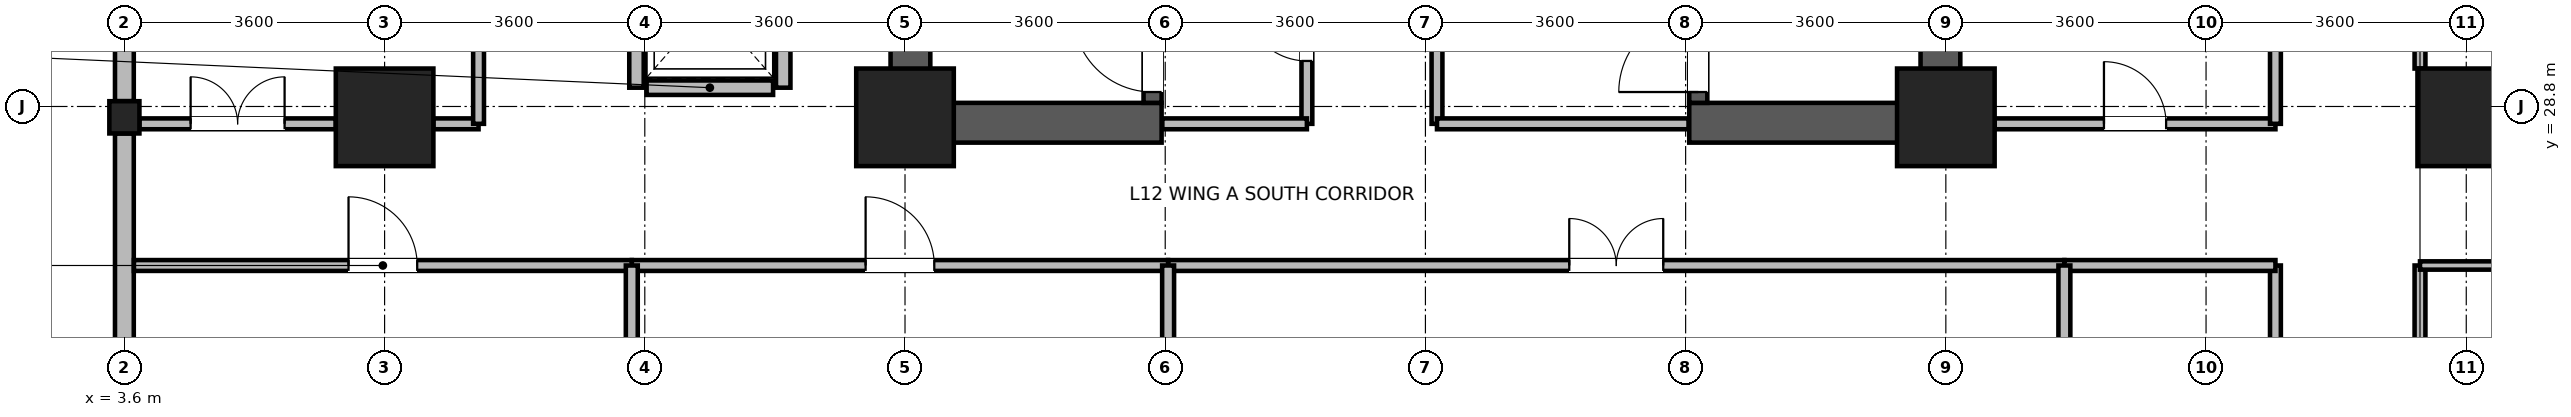
"""IFC4 building model, lengths in metres.
Left out: names, types, materials, properties, quantities, classifications, styles, units other than length and angle.
Written with IfcOpenShell. Run it as: python <this file> out.ifc"""

import sys

from ifc_helpers import new_model, si_unit, direction, frame, frame_2d, origin, origin_2d, place, context, subcontext, project, spatial, rectangle, i_section, extrude, source, transform, mapped, element, fill, save


model = new_model("IFC4")
c1 = context("Model", 3, precision=1e-05, world=origin(), true_north=direction((0.0, 1.0)))
c2 = subcontext(c1, "Body", "Model", "MODEL_VIEW")
j1 = project(units=[si_unit("LENGTHUNIT", "METRE"), si_unit("PLANEANGLEUNIT", "RADIAN")], contexts=[c1])
p1 = place(None, origin())
s1 = spatial("IfcSite", under=j1, at=p1, CompositionType="ELEMENT")
p2 = place(p1, origin())
s2 = spatial("IfcBuilding", under=s1, at=p2, CompositionType="ELEMENT")
p3 = place(p2, frame((0.0, 0.0, 51.2)))
s3 = spatial("IfcBuildingStorey", under=s2, at=p3, CompositionType="ELEMENT", Elevation=51.2)
for number, where, z_axis, x_axis in (
    (1, (14.475, 28.3, 0.0), (0.0, 0.0, 1.0), (0.0, 1.0, 0.0)),
    (2, (28.725, 28.3, 0.0), (0.0, 0.0, 1.0), (0.0, 1.0, 0.0)),
):
    element("IfcWall", number, at=place(p3, frame(where, z_axis=z_axis, x_axis=x_axis)), inside=s3, PredefinedType="SHEAR", context=c2, shape_type="SweptSolid", body=[
        extrude(rectangle(XDim=8.1, YDim=0.55, at=frame_2d((4.05, 0.0))), origin(), (0.0, 0.0, 1.0), 3.45),
    ])
for number, where, z_axis, x_axis in (
    (3, (14.75, 28.575, 0.0), (0.0, 0.0, 1.0), (1.0, 0.0, 0.0)),
    (4, (25.25, 28.575, 0.0), (0.0, 0.0, 1.0), (1.0, 0.0, 0.0)),
):
    element("IfcWall", number, at=place(p3, frame(where, z_axis=z_axis, x_axis=x_axis)), inside=s3, PredefinedType="SHEAR", context=c2, shape_type="SweptSolid", body=[
        extrude(rectangle(XDim=3.2, YDim=0.55, at=frame_2d((1.6, 0.0))), origin(), (0.0, 0.0, 1.0), 3.45),
    ])
p4 = place(p3, frame((17.825, 28.85, 0.0), z_axis=(0.0, 0.0, 1.0), x_axis=(0.0, 1.0, 0.0)))
e5 = element("IfcWall", 5, at=p4, inside=s3, PredefinedType="SHEAR", context=c2, shape_type="SweptSolid", body=[
    extrude(rectangle(XDim=7.0, YDim=0.25, at=frame_2d((3.5, 0.0))), origin(), (0.0, 0.0, 1.0), 3.45),
])
p5 = place(p4, frame((0.15, 0.0, 0.0)))
e6 = element("IfcOpeningElement", 6, at=p5, cuts=e5, PredefinedType="OPENING", context=c2, shape_type="SweptSolid", body=[
    extrude(rectangle(XDim=1.1, YDim=2.08, at=frame_2d((0.55, 1.04))), frame((0.0, 0.135, 0.0), z_axis=(0.0, -1.0, 0.0), x_axis=(1.0, 0.0, 0.0)), (0.0, 0.0, 1.0), 0.27),
])
p6 = place(p3, frame((25.375, 28.85, 0.0), z_axis=(0.0, 0.0, 1.0), x_axis=(0.0, 1.0, 0.0)))
e7 = element("IfcWall", 7, at=p6, inside=s3, PredefinedType="SHEAR", context=c2, shape_type="SweptSolid", body=[
    extrude(rectangle(XDim=7.0, YDim=0.25, at=frame_2d((3.5, 0.0))), origin(), (0.0, 0.0, 1.0), 3.45),
])
p7 = place(p6, frame((0.15, 0.0, 0.0)))
e8 = element("IfcOpeningElement", 8, at=p7, cuts=e7, PredefinedType="OPENING", context=c2, shape_type="SweptSolid", body=[
    extrude(rectangle(XDim=1.1, YDim=2.08, at=frame_2d((0.55, 1.04))), frame((0.0, 0.135, 0.0), z_axis=(0.0, -1.0, 0.0), x_axis=(1.0, 0.0, 0.0)), (0.0, 0.0, 1.0), 0.27),
])
m1 = source(origin(), c2, "Body", "SweptSolid", [
    extrude(rectangle(XDim=1.35, YDim=1.35, at=origin_2d()), origin(), (0.0, 0.0, 1.0), 3.7),
])
for number, where, z_axis, x_axis in (
    (9, (7.2, 28.65, 0.0), (0.0, 0.0, 1.0), (1.0, 0.0, 0.0)),
    (10, (14.4, 28.65, 0.0), (0.0, 0.0, 1.0), (1.0, 0.0, 0.0)),
    (11, (28.8, 28.65, 0.0), (0.0, 0.0, 1.0), (1.0, 0.0, 0.0)),
    (12, (36.0, 28.65, 0.0), (0.0, 0.0, 1.0), (1.0, 0.0, 0.0)),
):
    element("IfcColumn", number, at=place(p3, frame(where, z_axis=z_axis, x_axis=x_axis)), inside=s3, PredefinedType="COLUMN", context=c2, shape_type="MappedRepresentation", body=[
        mapped(m1, transform((0.0, 0.0, 0.0), x_axis=(1.0, 0.0, 0.0), y_axis=(0.0, 1.0, 0.0), z_axis=(0.0, 0.0, 1.0), scale=1.0)),
    ])
m2 = source(origin(), c2, "Body", "SweptSolid", [
    extrude(i_section(OverallWidth=0.416, OverallDepth=0.446, WebThickness=0.029, FlangeThickness=0.04, FilletRadius=0.015, at=origin_2d()), origin(), (0.0, 0.0, 1.0), 3.7),
])
p8 = place(p3, frame((3.6, 28.65, 0.0), z_axis=(0.0, 0.0, 1.0), x_axis=(1.0, 0.0, 0.0)))
e13 = element("IfcColumn", 13, at=p8, inside=s3, PredefinedType="COLUMN", context=c2, shape_type="MappedRepresentation", body=[
    mapped(m2, transform((0.0, 0.0, 0.0), x_axis=(1.0, 0.0, 0.0), y_axis=(0.0, 1.0, 0.0), z_axis=(0.0, 0.0, 1.0), scale=1.0)),
])
p9 = place(p3, frame((3.6, 28.874, 0.0), z_axis=(0.0, 0.0, 1.0), x_axis=(0.0, 1.0, 0.0)))
e14 = element("IfcWall", 14, at=p9, inside=s3, PredefinedType="STANDARD", context=c2, shape_type="SweptSolid", body=[
    extrude(rectangle(XDim=7.052, YDim=0.26, at=frame_2d((3.526, 0.0))), origin(), (0.0, 0.0, 1.0), 2.93),
])
p10 = place(p9, frame((1.013, 0.0, 0.85)))
e15 = element("IfcOpeningElement", 15, at=p10, cuts=e14, PredefinedType="OPENING", context=c2, shape_type="SweptSolid", body=[
    extrude(rectangle(XDim=1.5, YDim=1.85, at=frame_2d((0.75, 0.925))), frame((0.0, 0.14, 0.0), z_axis=(0.0, -1.0, 0.0), x_axis=(1.0, 0.0, 0.0)), (0.0, 0.0, 1.0), 0.28),
])
p11 = place(p9, frame((4.539, 0.0, 0.85)))
e16 = element("IfcOpeningElement", 16, at=p11, cuts=e14, PredefinedType="OPENING", context=c2, shape_type="SweptSolid", body=[
    extrude(rectangle(XDim=1.5, YDim=1.85, at=frame_2d((0.75, 0.925))), frame((0.0, 0.14, 0.0), z_axis=(0.0, -1.0, 0.0), x_axis=(1.0, 0.0, 0.0)), (0.0, 0.0, 1.0), 0.28),
])
p12 = place(p3, frame((3.6, 21.47, 0.0), z_axis=(0.0, 0.0, 1.0), x_axis=(0.0, 1.0, 0.0)))
e17 = element("IfcWall", 17, at=p12, inside=s3, PredefinedType="STANDARD", context=c2, shape_type="SweptSolid", body=[
    extrude(rectangle(XDim=6.956, YDim=0.26, at=frame_2d((3.478, 0.0))), origin(), (0.0, 0.0, 1.0), 3.43),
])
p13 = place(p12, frame((0.989, 0.0, 0.85)))
e18 = element("IfcOpeningElement", 18, at=p13, cuts=e17, PredefinedType="OPENING", context=c2, shape_type="SweptSolid", body=[
    extrude(rectangle(XDim=1.5, YDim=1.85, at=frame_2d((0.75, 0.925))), frame((0.0, 0.14, 0.0), z_axis=(0.0, -1.0, 0.0), x_axis=(1.0, 0.0, 0.0)), (0.0, 0.0, 1.0), 0.28),
])
p14 = place(p12, frame((3.003, 0.0, 0.85)))
e19 = element("IfcOpeningElement", 19, at=p14, cuts=e17, PredefinedType="OPENING", context=c2, shape_type="SweptSolid", body=[
    extrude(rectangle(XDim=0.95, YDim=1.75, at=frame_2d((0.475, 0.875))), frame((0.0, 0.14, 0.0), z_axis=(0.0, -1.0, 0.0), x_axis=(1.0, 0.0, 0.0)), (0.0, 0.0, 1.0), 0.28),
])
p15 = place(p3, frame((10.825, 29.06, 0.0), z_axis=(0.0, 0.0, 1.0), x_axis=(1.0, 0.0, 0.0)))
e20 = element("IfcWall", 20, at=p15, inside=s3, PredefinedType="PARTITIONING", context=c2, shape_type="SweptSolid", body=[
    extrude(rectangle(XDim=1.75, YDim=0.2, at=frame_2d((0.875, 0.0))), origin(), (0.0, 0.0, 1.0), 3.43),
])
for number, where, z_axis, x_axis in (
    (21, (10.685, 29.06, 0.0), (0.0, 0.0, 1.0), (0.0, 1.0, 0.0)),
    (22, (12.715, 29.06, 0.0), (0.0, 0.0, 1.0), (0.0, 1.0, 0.0)),
):
    element("IfcWall", number, at=place(p3, frame(where, z_axis=z_axis, x_axis=x_axis)), inside=s3, PredefinedType="PARTITIONING", context=c2, shape_type="SweptSolid", body=[
        extrude(rectangle(XDim=2.28, YDim=0.2, at=frame_2d((1.14, 0.0))), origin(), (0.0, 0.0, 1.0), 3.43),
    ])
p16 = place(p3, frame((18.04, 26.6, 0.0), z_axis=(0.0, 0.0, 1.0), x_axis=(1.0, 0.0, 0.0)))
e23 = element("IfcWall", 23, at=p16, inside=s3, PredefinedType="PARTITIONING", context=c2, shape_type="SweptSolid", body=[
    extrude(rectangle(XDim=12.4, YDim=0.15, at=frame_2d((6.2, 0.0))), origin(), (0.0, 0.0, 1.0), 3.43),
])
p17 = place(p16, frame((5.55, 0.0, 0.0)))
e24 = element("IfcOpeningElement", 24, at=p17, cuts=e23, PredefinedType="OPENING", context=c2, shape_type="SweptSolid", body=[
    extrude(rectangle(XDim=1.3, YDim=2.12, at=frame_2d((0.65, 1.06))), frame((0.0, 0.085, 0.0), z_axis=(0.0, -1.0, 0.0), x_axis=(1.0, 0.0, 0.0)), (0.0, 0.0, 1.0), 0.17),
])
p18 = place(p3, frame((35.36, 22.275, 0.0), z_axis=(0.0, 0.0, 1.0), x_axis=(0.0, 1.0, 0.0)))
e25 = element("IfcWall", 25, at=p18, inside=s3, PredefinedType="PARTITIONING", context=c2, shape_type="SweptSolid", body=[
    extrude(rectangle(XDim=4.325, YDim=0.15, at=frame_2d((2.163, 0.0))), origin(), (0.0, 0.0, 1.0), 3.43),
])
p19 = place(p3, frame((35.36, 29.325, 0.0), z_axis=(0.0, 0.0, 1.0), x_axis=(0.0, 1.0, 0.0)))
e26 = element("IfcWall", 26, at=p19, inside=s3, PredefinedType="PARTITIONING", context=c2, shape_type="SweptSolid", body=[
    extrude(rectangle(XDim=6.15, YDim=0.15, at=frame_2d((3.075, 0.0))), origin(), (0.0, 0.0, 1.0), 3.43),
])
p20 = place(p19, frame((2.425, 0.0, 0.0)))
e27 = element("IfcOpeningElement", 27, at=p20, cuts=e26, PredefinedType="OPENING", context=c2, shape_type="SweptSolid", body=[
    extrude(rectangle(XDim=1.3, YDim=2.12, at=frame_2d((0.65, 1.06))), frame((0.0, 0.085, 0.0), z_axis=(0.0, -1.0, 0.0), x_axis=(1.0, 0.0, 0.0)), (0.0, 0.0, 1.0), 0.17),
])
p21 = place(p3, frame((10.62, 26.6, 0.0), z_axis=(0.0, 0.0, 1.0), x_axis=(1.0, 0.0, 0.0)))
e28 = element("IfcWall", 28, at=p21, inside=s3, PredefinedType="PARTITIONING", context=c2, shape_type="SweptSolid", body=[
    extrude(rectangle(XDim=7.42, YDim=0.15, at=frame_2d((3.71, 0.0))), origin(), (0.0, 0.0, 1.0), 3.43),
])
p22 = place(p21, frame((3.235, 0.0, 0.0)))
e29 = element("IfcOpeningElement", 29, at=p22, cuts=e28, PredefinedType="OPENING", context=c2, shape_type="SweptSolid", body=[
    extrude(rectangle(XDim=0.95, YDim=2.1, at=frame_2d((0.475, 1.05))), frame((0.0, 0.085, 0.0), z_axis=(0.0, -1.0, 0.0), x_axis=(1.0, 0.0, 0.0)), (0.0, 0.0, 1.0), 0.17),
])
p23 = place(p3, frame((3.732, 26.6, 0.0), z_axis=(0.0, 0.0, 1.0), x_axis=(1.0, 0.0, 0.0)))
e30 = element("IfcWall", 30, at=p23, inside=s3, PredefinedType="PARTITIONING", context=c2, shape_type="SweptSolid", body=[
    extrude(rectangle(XDim=6.888, YDim=0.15, at=frame_2d((3.444, 0.0))), origin(), (0.0, 0.0, 1.0), 3.43),
])
p24 = place(p23, frame((2.969, 0.0, 0.0)))
e31 = element("IfcOpeningElement", 31, at=p24, cuts=e30, PredefinedType="OPENING", context=c2, shape_type="SweptSolid", body=[
    extrude(rectangle(XDim=0.95, YDim=2.1, at=frame_2d((0.475, 1.05))), frame((0.0, 0.085, 0.0), z_axis=(0.0, -1.0, 0.0), x_axis=(1.0, 0.0, 0.0)), (0.0, 0.0, 1.0), 0.17),
])
p25 = place(p3, frame((33.36, 21.6, 0.0), z_axis=(0.0, 0.0, 1.0), x_axis=(0.0, 1.0, 0.0)))
e32 = element("IfcWall", 32, at=p25, inside=s3, PredefinedType="PARTITIONING", context=c2, shape_type="SweptSolid", body=[
    extrude(rectangle(XDim=5.0, YDim=0.15, at=frame_2d((2.5, 0.0))), origin(), (0.0, 0.0, 1.0), 3.43),
])
p26 = place(p25, frame((2.07, 0.0, 0.0)))
e33 = element("IfcOpeningElement", 33, at=p26, cuts=e32, PredefinedType="OPENING", context=c2, shape_type="SweptSolid", body=[
    extrude(rectangle(XDim=0.86, YDim=2.02, at=frame_2d((0.43, 1.01))), frame((0.0, 0.085, 0.0), z_axis=(0.0, -1.0, 0.0), x_axis=(1.0, 0.0, 0.0)), (0.0, 0.0, 1.0), 0.17),
])
p27 = place(p3, frame((3.808, 28.56, 0.0), z_axis=(0.0, 0.0, 1.0), x_axis=(1.0, 0.0, 0.0)))
e34 = element("IfcWall", 34, at=p27, inside=s3, PredefinedType="PARTITIONING", context=c2, shape_type="SweptSolid", body=[
    extrude(rectangle(XDim=2.717, YDim=0.15, at=frame_2d((1.358, 0.0))), origin(), (0.0, 0.0, 1.0), 2.78),
])
p28 = place(p27, frame((0.708, 0.0, 0.0)))
e35 = element("IfcOpeningElement", 35, at=p28, cuts=e34, PredefinedType="OPENING", context=c2, shape_type="SweptSolid", body=[
    extrude(rectangle(XDim=1.3, YDim=2.12, at=frame_2d((0.65, 1.06))), frame((0.0, 0.085, 0.0), z_axis=(0.0, -1.0, 0.0), x_axis=(1.0, 0.0, 0.0)), (0.0, 0.0, 1.0), 0.17),
])
p29 = place(p3, frame((7.875, 28.56, 0.0), z_axis=(0.0, 0.0, 1.0), x_axis=(1.0, 0.0, 0.0)))
e36 = element("IfcWall", 36, at=p29, inside=s3, PredefinedType="PARTITIONING", context=c2, shape_type="SweptSolid", body=[
    extrude(rectangle(XDim=0.625, YDim=0.15, at=frame_2d((0.312, 0.0))), origin(), (0.0, 0.0, 1.0), 2.78),
])
p30 = place(p3, frame((29.475, 28.56, 0.0), z_axis=(0.0, 0.0, 1.0), x_axis=(1.0, 0.0, 0.0)))
e37 = element("IfcWall", 37, at=p30, inside=s3, PredefinedType="PARTITIONING", context=c2, shape_type="SweptSolid", body=[
    extrude(rectangle(XDim=3.885, YDim=0.15, at=frame_2d((1.942, 0.0))), origin(), (0.0, 0.0, 1.0), 2.78),
])
p31 = place(p30, frame((1.512, 0.0, 0.0)))
e38 = element("IfcOpeningElement", 38, at=p31, cuts=e37, PredefinedType="OPENING", context=c2, shape_type="SweptSolid", body=[
    extrude(rectangle(XDim=0.86, YDim=2.02, at=frame_2d((0.43, 1.01))), frame((0.0, 0.085, 0.0), z_axis=(0.0, -1.0, 0.0), x_axis=(1.0, 0.0, 0.0)), (0.0, 0.0, 1.0), 0.17),
])
for number, where, z_axis, x_axis in (
    (39, (8.5, 28.56, 0.0), (0.0, 0.0, 1.0), (0.0, 1.0, 0.0)),
    (40, (33.36, 28.56, 0.0), (0.0, 0.0, 1.0), (0.0, 1.0, 0.0)),
):
    element("IfcWall", number, at=place(p3, frame(where, z_axis=z_axis, x_axis=x_axis)), inside=s3, PredefinedType="PARTITIONING", context=c2, shape_type="SweptSolid", body=[
        extrude(rectangle(XDim=3.84, YDim=0.15, at=frame_2d((1.92, 0.0))), origin(), (0.0, 0.0, 1.0), 3.43),
    ])
p32 = place(p3, frame((30.44, 26.6, 0.0), z_axis=(0.0, 0.0, 1.0), x_axis=(1.0, 0.0, 0.0)))
e41 = element("IfcWall", 41, at=p32, inside=s3, PredefinedType="PARTITIONING", context=c2, shape_type="SweptSolid", body=[
    extrude(rectangle(XDim=2.92, YDim=0.15, at=frame_2d((1.46, 0.0))), origin(), (0.0, 0.0, 1.0), 3.43),
])
p33 = place(p3, frame((19.96, 28.56, 0.0), z_axis=(0.0, 0.0, 1.0), x_axis=(0.0, 1.0, 0.0)))
e42 = element("IfcWall", 42, at=p33, inside=s3, PredefinedType="PARTITIONING", context=c2, shape_type="SweptSolid", body=[
    extrude(rectangle(XDim=2.6, YDim=0.15, at=frame_2d((1.3, 0.0))), origin(), (0.0, 0.0, 1.0), 3.43),
])
p34 = place(p33, frame((0.87, 0.0, 0.0)))
e43 = element("IfcOpeningElement", 43, at=p34, cuts=e42, PredefinedType="OPENING", context=c2, shape_type="SweptSolid", body=[
    extrude(rectangle(XDim=0.86, YDim=2.02, at=frame_2d((0.43, 1.01))), frame((0.0, 0.085, 0.0), z_axis=(0.0, -1.0, 0.0), x_axis=(1.0, 0.0, 0.0)), (0.0, 0.0, 1.0), 0.17),
])
p35 = place(p3, frame((17.96, 28.56, 0.0), z_axis=(0.0, 0.0, 1.0), x_axis=(1.0, 0.0, 0.0)))
e44 = element("IfcWall", 44, at=p35, inside=s3, PredefinedType="PARTITIONING", context=c2, shape_type="SweptSolid", body=[
    extrude(rectangle(XDim=2.0, YDim=0.15, at=frame_2d((1.0, 0.0))), origin(), (0.0, 0.0, 1.0), 2.23),
])
p36 = place(p3, frame((35.36, 26.6, 0.0), z_axis=(0.0, 0.0, 1.0), x_axis=(1.0, 0.0, 0.0)))
e45 = element("IfcWall", 45, at=p36, inside=s3, PredefinedType="PARTITIONING", context=c2, shape_type="SweptSolid", body=[
    extrude(rectangle(XDim=7.42, YDim=0.115, at=frame_2d((3.71, 0.0))), origin(), (0.0, 0.0, 1.0), 3.43),
])
p37 = place(p3, frame((18.04, 21.732, 0.0), z_axis=(0.0, 0.0, 1.0), x_axis=(0.0, 1.0, 0.0)))
e46 = element("IfcWall", 46, at=p37, inside=s3, PredefinedType="PARTITIONING", context=c2, shape_type="SweptSolid", body=[
    extrude(rectangle(XDim=4.868, YDim=0.165, at=frame_2d((2.434, 0.0))), origin(), (0.0, 0.0, 1.0), 3.07),
])
p38 = place(p3, frame((30.44, 21.6, 0.0), z_axis=(0.0, 0.0, 1.0), x_axis=(0.0, 1.0, 0.0)))
e47 = element("IfcWall", 47, at=p38, inside=s3, PredefinedType="PARTITIONING", context=c2, shape_type="SweptSolid", body=[
    extrude(rectangle(XDim=5.0, YDim=0.165, at=frame_2d((2.5, 0.0))), origin(), (0.0, 0.0, 1.0), 3.43),
])
p39 = place(p3, frame((21.76, 28.56, 0.0), z_axis=(0.0, 0.0, 1.0), x_axis=(0.0, 1.0, 0.0)))
e48 = element("IfcWall", 48, at=p39, inside=s3, PredefinedType="PARTITIONING", context=c2, shape_type="SweptSolid", body=[
    extrude(rectangle(XDim=4.6, YDim=0.15, at=frame_2d((2.3, 0.0))), origin(), (0.0, 0.0, 1.0), 3.43),
])
p40 = place(p39, frame((1.55, 0.0, 0.0)))
e49 = element("IfcOpeningElement", 49, at=p40, cuts=e48, PredefinedType="OPENING", context=c2, shape_type="SweptSolid", body=[
    extrude(rectangle(XDim=1.5, YDim=2.1, at=frame_2d((0.75, 1.05))), frame((0.0, 0.085, 0.0), z_axis=(0.0, -1.0, 0.0), x_axis=(1.0, 0.0, 0.0)), (0.0, 0.0, 1.0), 0.17),
])
p41 = place(p3, frame((21.76, 28.56, 0.0), z_axis=(0.0, 0.0, 1.0), x_axis=(1.0, 0.0, 0.0)))
e50 = element("IfcWall", 50, at=p41, inside=s3, PredefinedType="PARTITIONING", context=c2, shape_type="SweptSolid", body=[
    extrude(rectangle(XDim=3.48, YDim=0.15, at=frame_2d((1.74, 0.0))), origin(), (0.0, 0.0, 1.0), 2.23),
])
p42 = place(p3, frame((10.62, 23.5, 0.0), z_axis=(0.0, 0.0, 1.0), x_axis=(0.0, 1.0, 0.0)))
e51 = element("IfcWall", 51, at=p42, inside=s3, PredefinedType="PARTITIONING", context=c2, shape_type="SweptSolid", body=[
    extrude(rectangle(XDim=3.1, YDim=0.165, at=frame_2d((1.55, 0.0))), origin(), (0.0, 0.0, 1.0), 3.43),
])
p43 = place(p5, origin())
e52 = element("IfcDoor", 52, at=p43, inside=s3, OperationType="SINGLE_SWING_RIGHT", PredefinedType="DOOR", context=c2, shape_type="SweptSolid", body=[
    extrude(rectangle(XDim=1.1, YDim=2.08, at=frame_2d((0.55, 1.04))), frame((0.0, 0.025, 0.0), z_axis=(0.0, -1.0, 0.0), x_axis=(1.0, 0.0, 0.0)), (0.0, 0.0, 1.0), 0.05),
])
fill(e6, e52)
p44 = place(p7, origin())
e53 = element("IfcDoor", 53, at=p44, inside=s3, OperationType="SINGLE_SWING_LEFT", PredefinedType="DOOR", context=c2, shape_type="SweptSolid", body=[
    extrude(rectangle(XDim=1.1, YDim=2.08, at=frame_2d((0.55, 1.04))), frame((0.0, 0.025, 0.0), z_axis=(0.0, -1.0, 0.0), x_axis=(1.0, 0.0, 0.0)), (0.0, 0.0, 1.0), 0.05),
])
fill(e8, e53)
p45 = place(p17, origin())
e54 = element("IfcDoor", 54, at=p45, inside=s3, OperationType="DOUBLE_DOOR_SINGLE_SWING", PredefinedType="DOOR", context=c2, shape_type="SweptSolid", body=[
    extrude(rectangle(XDim=1.3, YDim=2.12, at=frame_2d((0.65, 1.06))), frame((0.0, 0.025, 0.0), z_axis=(0.0, -1.0, 0.0), x_axis=(1.0, 0.0, 0.0)), (0.0, 0.0, 1.0), 0.05),
])
fill(e24, e54)
p46 = place(p22, origin())
e55 = element("IfcDoor", 55, at=p46, inside=s3, OperationType="SINGLE_SWING_LEFT", PredefinedType="DOOR", context=c2, shape_type="SweptSolid", body=[
    extrude(rectangle(XDim=0.95, YDim=2.1, at=frame_2d((0.475, 1.05))), frame((0.0, 0.025, 0.0), z_axis=(0.0, -1.0, 0.0), x_axis=(1.0, 0.0, 0.0)), (0.0, 0.0, 1.0), 0.05),
])
fill(e29, e55)
p47 = place(p24, origin())
e56 = element("IfcDoor", 56, at=p47, inside=s3, OperationType="SINGLE_SWING_LEFT", PredefinedType="DOOR", context=c2, shape_type="SweptSolid", body=[
    extrude(rectangle(XDim=0.95, YDim=2.1, at=frame_2d((0.475, 1.05))), frame((0.0, 0.025, 0.0), z_axis=(0.0, -1.0, 0.0), x_axis=(1.0, 0.0, 0.0)), (0.0, 0.0, 1.0), 0.05),
])
fill(e31, e56)
p48 = place(p28, origin())
e57 = element("IfcDoor", 57, at=p48, inside=s3, OperationType="DOUBLE_DOOR_SINGLE_SWING", PredefinedType="DOOR", context=c2, shape_type="SweptSolid", body=[
    extrude(rectangle(XDim=1.3, YDim=2.12, at=frame_2d((0.65, 1.06))), frame((0.0, 0.025, 0.0), z_axis=(0.0, -1.0, 0.0), x_axis=(1.0, 0.0, 0.0)), (0.0, 0.0, 1.0), 0.05),
])
fill(e35, e57)
p49 = place(p31, origin())
e58 = element("IfcDoor", 58, at=p49, inside=s3, OperationType="SINGLE_SWING_LEFT", PredefinedType="DOOR", context=c2, shape_type="SweptSolid", body=[
    extrude(rectangle(XDim=0.86, YDim=2.02, at=frame_2d((0.43, 1.01))), frame((0.0, 0.025, 0.0), z_axis=(0.0, -1.0, 0.0), x_axis=(1.0, 0.0, 0.0)), (0.0, 0.0, 1.0), 0.05),
])
fill(e38, e58)
p50 = place(p34, origin())
e59 = element("IfcDoor", 59, at=p50, inside=s3, OperationType="SINGLE_SWING_RIGHT", PredefinedType="DOOR", context=c2, shape_type="SweptSolid", body=[
    extrude(rectangle(XDim=0.86, YDim=2.02, at=frame_2d((0.43, 1.01))), frame((0.0, 0.025, 0.0), z_axis=(0.0, -1.0, 0.0), x_axis=(1.0, 0.0, 0.0)), (0.0, 0.0, 1.0), 0.05),
])
fill(e43, e59)
save(model, sys.argv[1])
